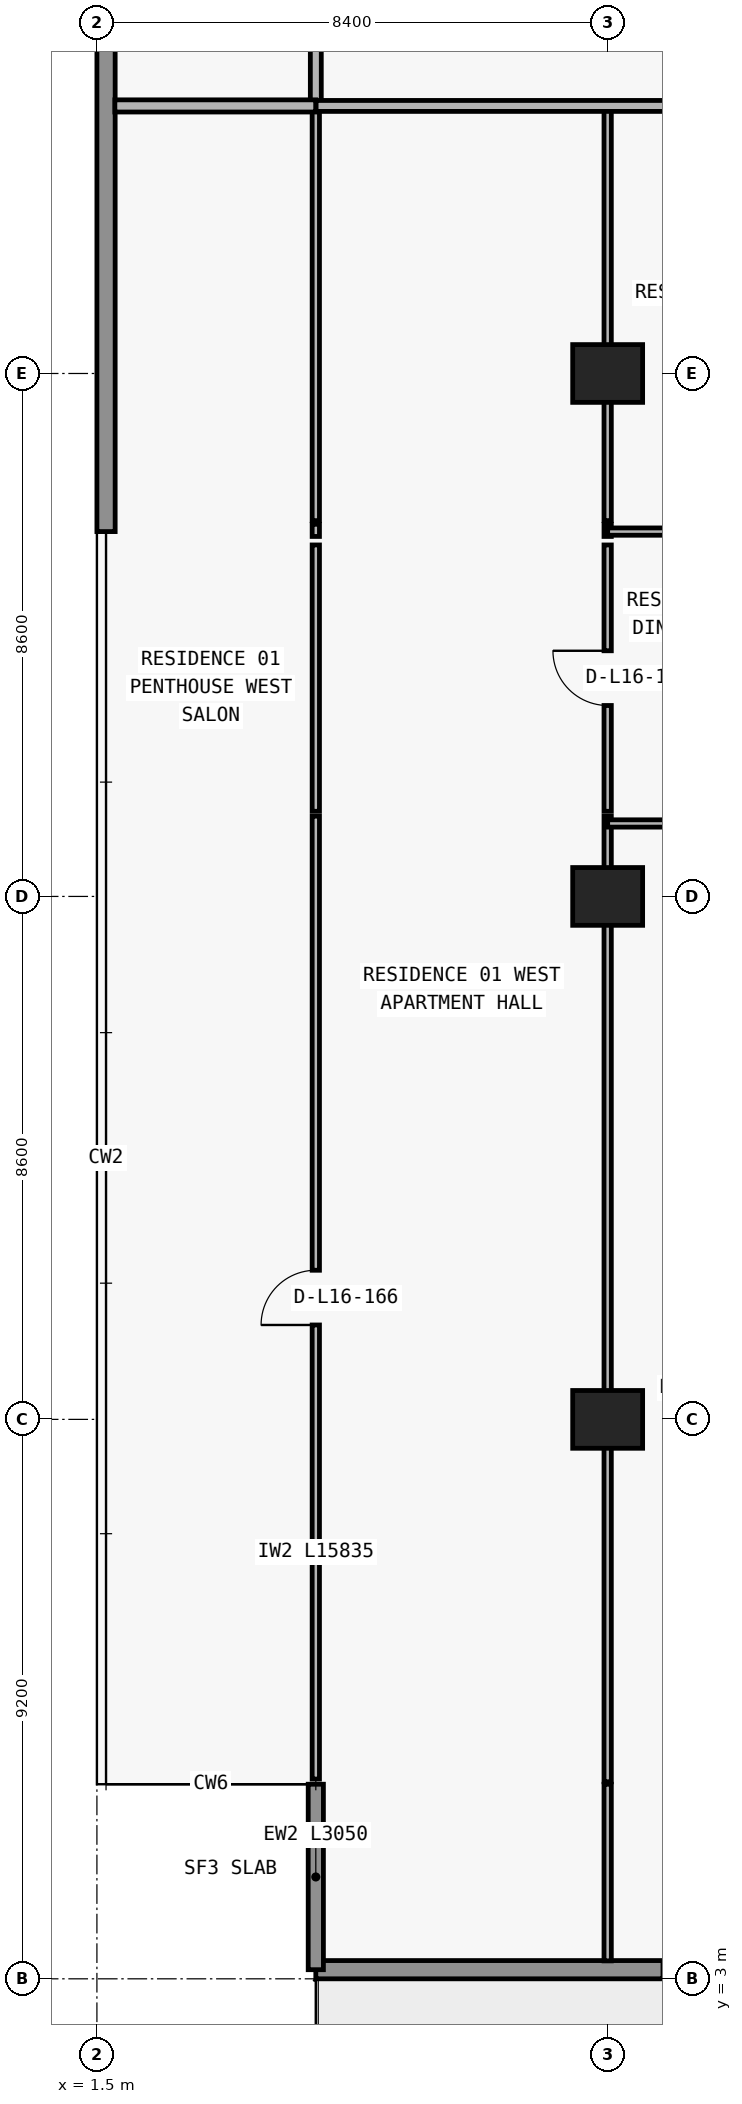
"""IFC4 building model, lengths in metres.
Left out: names, types, materials, properties, quantities, classifications, styles, units other than length and angle.
Written with IfcOpenShell. Run it as: python <this file> out.ifc"""

import sys

from ifc_helpers import new_model, si_unit, direction, frame, frame_2d, origin, origin_2d, place, context, subcontext, project, spatial, rectangle, extrude, element, fill, save


model = new_model("IFC4")
c1 = context("Model", 3, precision=1e-05, world=origin(), true_north=direction((0.0, 1.0)))
c2 = subcontext(c1, "Body", "Model", "MODEL_VIEW")
j1 = project(units=[si_unit("LENGTHUNIT", "METRE"), si_unit("PLANEANGLEUNIT", "RADIAN")], contexts=[c1])
p1 = place(None, origin())
s1 = spatial("IfcSite", under=j1, at=p1, CompositionType="ELEMENT")
p2 = place(p1, origin())
s2 = spatial("IfcBuilding", under=s1, at=p2, CompositionType="ELEMENT")
p3 = place(p2, frame((0.0, 0.0, 63.0)))
s3 = spatial("IfcBuildingStorey", under=s2, at=p3, CompositionType="ELEMENT", Elevation=63.0)
for number, where, z_axis, x_axis in (
    (1, (9.9, 12.2, 0.0), (0.0, 0.0, 1.0), (1.0, 0.0, 0.0)),
    (2, (9.9, 20.8, 0.0), (0.0, 0.0, 1.0), (1.0, 0.0, 0.0)),
    (3, (9.9, 29.4, 0.0), (0.0, 0.0, 1.0), (1.0, 0.0, 0.0)),
):
    element("IfcColumn", number, at=place(p3, frame(where, z_axis=z_axis, x_axis=x_axis)), inside=s3, PredefinedType="COLUMN", context=c2, shape_type="SweptSolid", body=[
        extrude(rectangle(XDim=1.15, YDim=0.95, at=origin_2d()), origin(), (0.0, 0.0, 1.0), 3.05),
    ])
p4 = place(p3, frame((72.7, 3.15, 0.0), z_axis=(0.0, 0.0, 1.0), x_axis=(-1.0, 0.0, 0.0)))
e4 = element("IfcWall", 4, at=p4, inside=s3, PredefinedType="STANDARD", context=c2, shape_type="SweptSolid", body=[
    extrude(rectangle(XDim=67.6, YDim=0.3, at=frame_2d((33.8, 0.0))), origin(), (0.0, 0.0, 1.0), 3.05),
])
p5 = place(p4, frame((59.89, 0.0, 0.0)))
e5 = element("IfcOpeningElement", 5, at=p5, cuts=e4, PredefinedType="OPENING", context=c2, shape_type="SweptSolid", body=[
    extrude(rectangle(XDim=2.0, YDim=2.3, at=frame_2d((1.0, 1.15))), frame((0.0, 0.16, 0.0), z_axis=(0.0, -1.0, 0.0), x_axis=(1.0, 0.0, 0.0)), (0.0, 0.0, 1.0), 0.32),
])
p6 = place(p4, frame((55.21, 0.0, 0.65)))
e6 = element("IfcOpeningElement", 6, at=p6, cuts=e4, PredefinedType="OPENING", context=c2, shape_type="SweptSolid", body=[
    extrude(rectangle(XDim=2.6, YDim=1.85, at=frame_2d((1.3, 0.925))), frame((0.0, 0.16, 0.0), z_axis=(0.0, -1.0, 0.0), x_axis=(1.0, 0.0, 0.0)), (0.0, 0.0, 1.0), 0.32),
])
p7 = place(p4, frame((49.1, 0.0, 0.85)))
e7 = element("IfcOpeningElement", 7, at=p7, cuts=e4, PredefinedType="OPENING", context=c2, shape_type="SweptSolid", body=[
    extrude(rectangle(XDim=2.2, YDim=1.55, at=frame_2d((1.1, 0.775))), frame((0.0, 0.16, 0.0), z_axis=(0.0, -1.0, 0.0), x_axis=(1.0, 0.0, 0.0)), (0.0, 0.0, 1.0), 0.32),
])
p8 = place(p4, frame((43.09, 0.0, 0.0)))
e8 = element("IfcOpeningElement", 8, at=p8, cuts=e4, PredefinedType="OPENING", context=c2, shape_type="SweptSolid", body=[
    extrude(rectangle(XDim=2.0, YDim=2.3, at=frame_2d((1.0, 1.15))), frame((0.0, 0.16, 0.0), z_axis=(0.0, -1.0, 0.0), x_axis=(1.0, 0.0, 0.0)), (0.0, 0.0, 1.0), 0.32),
])
p9 = place(p4, frame((38.41, 0.0, 0.65)))
e9 = element("IfcOpeningElement", 9, at=p9, cuts=e4, PredefinedType="OPENING", context=c2, shape_type="SweptSolid", body=[
    extrude(rectangle(XDim=2.6, YDim=1.85, at=frame_2d((1.3, 0.925))), frame((0.0, 0.16, 0.0), z_axis=(0.0, -1.0, 0.0), x_axis=(1.0, 0.0, 0.0)), (0.0, 0.0, 1.0), 0.32),
])
p10 = place(p4, frame((32.7, 0.0, 0.85)))
e10 = element("IfcOpeningElement", 10, at=p10, cuts=e4, PredefinedType="OPENING", context=c2, shape_type="SweptSolid", body=[
    extrude(rectangle(XDim=2.2, YDim=1.55, at=frame_2d((1.1, 0.775))), frame((0.0, 0.16, 0.0), z_axis=(0.0, -1.0, 0.0), x_axis=(1.0, 0.0, 0.0)), (0.0, 0.0, 1.0), 0.32),
])
p11 = place(p4, frame((27.026, 0.0, 0.0)))
e11 = element("IfcOpeningElement", 11, at=p11, cuts=e4, PredefinedType="OPENING", context=c2, shape_type="SweptSolid", body=[
    extrude(rectangle(XDim=2.0, YDim=2.3, at=frame_2d((1.0, 1.15))), frame((0.0, 0.16, 0.0), z_axis=(0.0, -1.0, 0.0), x_axis=(1.0, 0.0, 0.0)), (0.0, 0.0, 1.0), 0.32),
])
p12 = place(p4, frame((22.726, 0.0, 0.85)))
e12 = element("IfcOpeningElement", 12, at=p12, cuts=e4, PredefinedType="OPENING", context=c2, shape_type="SweptSolid", body=[
    extrude(rectangle(XDim=2.2, YDim=1.55, at=frame_2d((1.1, 0.775))), frame((0.0, 0.16, 0.0), z_axis=(0.0, -1.0, 0.0), x_axis=(1.0, 0.0, 0.0)), (0.0, 0.0, 1.0), 0.32),
])
p13 = place(p4, frame((18.29, 0.0, 0.0)))
e13 = element("IfcOpeningElement", 13, at=p13, cuts=e4, PredefinedType="OPENING", context=c2, shape_type="SweptSolid", body=[
    extrude(rectangle(XDim=2.0, YDim=2.3, at=frame_2d((1.0, 1.15))), frame((0.0, 0.16, 0.0), z_axis=(0.0, -1.0, 0.0), x_axis=(1.0, 0.0, 0.0)), (0.0, 0.0, 1.0), 0.32),
])
p14 = place(p4, frame((14.19, 0.0, 0.85)))
e14 = element("IfcOpeningElement", 14, at=p14, cuts=e4, PredefinedType="OPENING", context=c2, shape_type="SweptSolid", body=[
    extrude(rectangle(XDim=1.8, YDim=1.55, at=frame_2d((0.9, 0.775))), frame((0.0, 0.16, 0.0), z_axis=(0.0, -1.0, 0.0), x_axis=(1.0, 0.0, 0.0)), (0.0, 0.0, 1.0), 0.32),
])
p15 = place(p4, frame((10.226, 0.0, 0.0)))
e15 = element("IfcOpeningElement", 15, at=p15, cuts=e4, PredefinedType="OPENING", context=c2, shape_type="SweptSolid", body=[
    extrude(rectangle(XDim=2.0, YDim=2.3, at=frame_2d((1.0, 1.15))), frame((0.0, 0.16, 0.0), z_axis=(0.0, -1.0, 0.0), x_axis=(1.0, 0.0, 0.0)), (0.0, 0.0, 1.0), 0.32),
])
p16 = place(p4, frame((5.926, 0.0, 0.85)))
e16 = element("IfcOpeningElement", 16, at=p16, cuts=e4, PredefinedType="OPENING", context=c2, shape_type="SweptSolid", body=[
    extrude(rectangle(XDim=2.2, YDim=1.55, at=frame_2d((1.1, 0.775))), frame((0.0, 0.16, 0.0), z_axis=(0.0, -1.0, 0.0), x_axis=(1.0, 0.0, 0.0)), (0.0, 0.0, 1.0), 0.32),
])
p17 = place(p3, frame((5.1, 6.2, 0.0), z_axis=(0.0, 0.0, 1.0), x_axis=(0.0, -1.0, 0.0)))
e17 = element("IfcWall", 17, at=p17, inside=s3, PredefinedType="ELEMENTEDWALL", context=c2, shape_type="SweptSolid", body=[
    extrude(rectangle(XDim=3.05, YDim=0.25, at=frame_2d((1.525, 0.0))), origin(), (0.0, 0.0, 1.0), 3.05),
])
p18 = place(p3, frame((1.65, 26.8, 0.0), z_axis=(0.0, 0.0, 1.0), x_axis=(0.0, 1.0, 0.0)))
e18 = element("IfcWall", 18, at=p18, inside=s3, PredefinedType="STANDARD", context=c2, shape_type="SweptSolid", body=[
    extrude(rectangle(XDim=20.6, YDim=0.3, at=frame_2d((10.3, 0.0))), origin(), (0.0, 0.0, 1.0), 3.05),
])
p19 = place(p3, frame((5.1, 6.285, 0.0), z_axis=(0.0, 0.0, 1.0), x_axis=(0.0, 1.0, 0.0)))
e19 = element("IfcWall", 19, at=p19, inside=s3, PredefinedType="PARTITIONING", context=c2, shape_type="SweptSolid", body=[
    extrude(rectangle(XDim=15.835, YDim=0.12, at=frame_2d((7.917, 0.0))), origin(), (0.0, 0.0, 1.0), 3.05),
])
p20 = place(p19, frame((7.468, 0.0, 0.0)))
e20 = element("IfcOpeningElement", 20, at=p20, cuts=e19, PredefinedType="OPENING", context=c2, shape_type="SweptSolid", body=[
    extrude(rectangle(XDim=0.9, YDim=2.15, at=frame_2d((0.45, 1.075))), frame((0.0, 0.07, 0.0), z_axis=(0.0, -1.0, 0.0), x_axis=(1.0, 0.0, 0.0)), (0.0, 0.0, 1.0), 0.14),
])
p21 = place(p3, frame((5.1, 22.2, 0.0), z_axis=(0.0, 0.0, 1.0), x_axis=(0.0, 1.0, 0.0)))
e21 = element("IfcWall", 21, at=p21, inside=s3, PredefinedType="PARTITIONING", context=c2, shape_type="SweptSolid", body=[
    extrude(rectangle(XDim=4.38, YDim=0.12, at=frame_2d((2.19, 0.0))), origin(), (0.0, 0.0, 1.0), 3.05),
])
p22 = place(p3, frame((5.1, 26.72, 0.0), z_axis=(0.0, 0.0, 1.0), x_axis=(0.0, 1.0, 0.0)))
e22 = element("IfcWall", 22, at=p22, inside=s3, PredefinedType="PARTITIONING", context=c2, shape_type="SweptSolid", body=[
    extrude(rectangle(XDim=0.2, YDim=0.12, at=frame_2d((0.1, 0.0))), origin(), (0.0, 0.0, 1.0), 3.05),
])
p23 = place(p3, frame((5.1, 26.98, 0.0), z_axis=(0.0, 0.0, 1.0), x_axis=(0.0, 1.0, 0.0)))
e23 = element("IfcWall", 23, at=p23, inside=s3, PredefinedType="PARTITIONING", context=c2, shape_type="SweptSolid", body=[
    extrude(rectangle(XDim=6.82, YDim=0.12, at=frame_2d((3.41, 0.0))), origin(), (0.0, 0.0, 1.0), 3.05),
])
p24 = place(p3, frame((5.1, 33.805, 0.0), z_axis=(0.0, 0.0, 1.0), x_axis=(0.0, 1.0, 0.0)))
e24 = element("IfcWall", 24, at=p24, inside=s3, PredefinedType="PARTITIONING", context=c2, shape_type="SweptSolid", body=[
    extrude(rectangle(XDim=3.095, YDim=0.18, at=frame_2d((1.547, 0.0))), origin(), (0.0, 0.0, 1.0), 3.05),
])
p25 = place(p3, frame((9.9, 3.295, 0.0), z_axis=(0.0, 0.0, 1.0), x_axis=(0.0, 1.0, 0.0)))
e25 = element("IfcWall", 25, at=p25, inside=s3, PredefinedType="PARTITIONING", context=c2, shape_type="SweptSolid", body=[
    extrude(rectangle(XDim=2.905, YDim=0.12, at=frame_2d((1.453, 0.0))), origin(), (0.0, 0.0, 1.0), 3.05),
])
p26 = place(p3, frame((9.9, 6.24, 0.0), z_axis=(0.0, 0.0, 1.0), x_axis=(0.0, 1.0, 0.0)))
e26 = element("IfcWall", 26, at=p26, inside=s3, PredefinedType="PARTITIONING", context=c2, shape_type="SweptSolid", body=[
    extrude(rectangle(XDim=15.88, YDim=0.12, at=frame_2d((7.94, 0.0))), origin(), (0.0, 0.0, 1.0), 2.11),
])
p27 = place(p3, frame((9.9, 22.2, 0.0), z_axis=(0.0, 0.0, 1.0), x_axis=(0.0, 1.0, 0.0)))
e27 = element("IfcWall", 27, at=p27, inside=s3, PredefinedType="PARTITIONING", context=c2, shape_type="SweptSolid", body=[
    extrude(rectangle(XDim=4.38, YDim=0.12, at=frame_2d((2.19, 0.0))), origin(), (0.0, 0.0, 1.0), 2.11),
])
p28 = place(p27, frame((1.74, 0.0, 0.0)))
e28 = element("IfcOpeningElement", 28, at=p28, cuts=e27, PredefinedType="OPENING", context=c2, shape_type="SweptSolid", body=[
    extrude(rectangle(XDim=0.9, YDim=2.06, at=frame_2d((0.45, 1.03))), frame((0.0, 0.07, 0.0), z_axis=(0.0, -1.0, 0.0), x_axis=(1.0, 0.0, 0.0)), (0.0, 0.0, 1.0), 0.14),
])
p29 = place(p3, frame((9.9, 26.72, 0.0), z_axis=(0.0, 0.0, 1.0), x_axis=(0.0, 1.0, 0.0)))
e29 = element("IfcWall", 29, at=p29, inside=s3, PredefinedType="PARTITIONING", context=c2, shape_type="SweptSolid", body=[
    extrude(rectangle(XDim=0.2, YDim=0.12, at=frame_2d((0.1, 0.0))), origin(), (0.0, 0.0, 1.0), 2.11),
])
p30 = place(p3, frame((9.9, 26.98, 0.0), z_axis=(0.0, 0.0, 1.0), x_axis=(0.0, 1.0, 0.0)))
e30 = element("IfcWall", 30, at=p30, inside=s3, PredefinedType="PARTITIONING", context=c2, shape_type="SweptSolid", body=[
    extrude(rectangle(XDim=6.82, YDim=0.12, at=frame_2d((3.41, 0.0))), origin(), (0.0, 0.0, 1.0), 2.11),
])
p31 = place(p3, frame((9.9, 22.0, 0.0), z_axis=(0.0, 0.0, 1.0), x_axis=(1.0, 0.0, 0.0)))
e31 = element("IfcWall", 31, at=p31, inside=s3, PredefinedType="PARTITIONING", context=c2, shape_type="SweptSolid", body=[
    extrude(rectangle(XDim=8.4, YDim=0.12, at=frame_2d((4.2, 0.0))), origin(), (0.0, 0.0, 1.0), 3.05),
])
p32 = place(p31, frame((1.44, 0.0, 0.0)))
e32 = element("IfcOpeningElement", 32, at=p32, cuts=e31, PredefinedType="OPENING", context=c2, shape_type="SweptSolid", body=[
    extrude(rectangle(XDim=0.9, YDim=2.15, at=frame_2d((0.45, 1.075))), frame((0.0, 0.07, 0.0), z_axis=(0.0, -1.0, 0.0), x_axis=(1.0, 0.0, 0.0)), (0.0, 0.0, 1.0), 0.14),
])
p33 = place(p3, frame((9.9, 26.8, 0.0), z_axis=(0.0, 0.0, 1.0), x_axis=(1.0, 0.0, 0.0)))
e33 = element("IfcWall", 33, at=p33, inside=s3, PredefinedType="PARTITIONING", context=c2, shape_type="SweptSolid", body=[
    extrude(rectangle(XDim=8.395, YDim=0.12, at=frame_2d((4.198, 0.0))), origin(), (0.0, 0.0, 1.0), 3.05),
])
p34 = place(p33, frame((1.44, 0.0, 0.0)))
e34 = element("IfcOpeningElement", 34, at=p34, cuts=e33, PredefinedType="OPENING", context=c2, shape_type="SweptSolid", body=[
    extrude(rectangle(XDim=0.9, YDim=2.15, at=frame_2d((0.45, 1.075))), frame((0.0, 0.07, 0.0), z_axis=(0.0, -1.0, 0.0), x_axis=(1.0, 0.0, 0.0)), (0.0, 0.0, 1.0), 0.14),
])
p35 = place(p3, frame((1.795, 33.8, 0.0), z_axis=(0.0, 0.0, 1.0), x_axis=(1.0, 0.0, 0.0)))
e35 = element("IfcWall", 35, at=p35, inside=s3, PredefinedType="PARTITIONING", context=c2, shape_type="SweptSolid", body=[
    extrude(rectangle(XDim=3.305, YDim=0.2, at=frame_2d((1.653, 0.0))), origin(), (0.0, 0.0, 1.0), 3.05),
])
p36 = place(p3, frame((5.105, 33.8, 0.0), z_axis=(0.0, 0.0, 1.0), x_axis=(1.0, 0.0, 0.0)))
e36 = element("IfcWall", 36, at=p36, inside=s3, PredefinedType="PARTITIONING", context=c2, shape_type="SweptSolid", body=[
    extrude(rectangle(XDim=21.545, YDim=0.18, at=frame_2d((10.772, 0.0))), origin(), (0.0, 0.0, 1.0), 3.05),
])
p37 = place(p36, frame((7.745, 0.0, 0.0)))
e37 = element("IfcOpeningElement", 37, at=p37, cuts=e36, PredefinedType="OPENING", context=c2, shape_type="SweptSolid", body=[
    extrude(rectangle(XDim=1.0, YDim=2.2, at=frame_2d((0.5, 1.1))), frame((0.0, 0.1, 0.0), z_axis=(0.0, -1.0, 0.0), x_axis=(1.0, 0.0, 0.0)), (0.0, 0.0, 1.0), 0.2),
])
p38 = place(p28, origin())
e38 = element("IfcDoor", 38, at=p38, inside=s3, OperationType="SINGLE_SWING_RIGHT", PredefinedType="DOOR", context=c2, shape_type="SweptSolid", body=[
    extrude(rectangle(XDim=0.9, YDim=2.06, at=frame_2d((0.45, 1.03))), frame((0.0, 0.025, 0.0), z_axis=(0.0, -1.0, 0.0), x_axis=(1.0, 0.0, 0.0)), (0.0, 0.0, 1.0), 0.05),
])
fill(e28, e38)
p39 = place(p20, origin())
e39 = element("IfcDoor", 39, at=p39, inside=s3, OperationType="SINGLE_SWING_LEFT", PredefinedType="DOOR", context=c2, shape_type="SweptSolid", body=[
    extrude(rectangle(XDim=0.9, YDim=2.15, at=frame_2d((0.45, 1.075))), frame((0.0, 0.025, 0.0), z_axis=(0.0, -1.0, 0.0), x_axis=(1.0, 0.0, 0.0)), (0.0, 0.0, 1.0), 0.05),
])
fill(e20, e39)
save(model, sys.argv[1])
